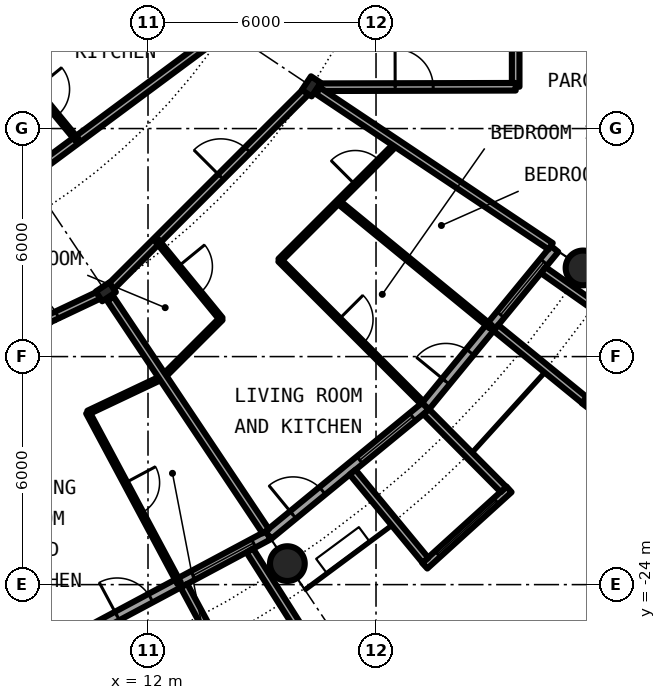
"""IFC4 building model, lengths in metres.
Left out: names, types, materials, properties, quantities, classifications, styles, units other than length and angle.
Written with IfcOpenShell. Run it as: python <this file> out.ifc"""

import sys

from ifc_helpers import new_model, si_unit, direction, frame, frame_2d, origin, origin_2d, place, context, subcontext, project, spatial, rectangle, circle, hollow_circle, i_section, extrude, element, fill, save


model = new_model("IFC4")
c1 = context("Model", 3, precision=1e-05, world=origin(), true_north=direction((0.0, 1.0)))
c2 = subcontext(c1, "Body", "Model", "MODEL_VIEW")
j1 = project(units=[si_unit("LENGTHUNIT", "METRE"), si_unit("PLANEANGLEUNIT", "RADIAN")], contexts=[c1])
p1 = place(None, origin())
s1 = spatial("IfcSite", under=j1, at=p1, CompositionType="ELEMENT")
p2 = place(p1, origin())
s2 = spatial("IfcBuilding", under=s1, at=p2, CompositionType="ELEMENT")
p3 = place(p2, frame((0.0, 0.0, 120.8)))
s3 = spatial("IfcBuildingStorey", under=s2, at=p3, CompositionType="ELEMENT", Elevation=120.8)
for number, where, z_axis, x_axis in (
    (1, (15.667, -23.448, 0.0), (0.0, 0.0, 1.0), (1.0, 0.0, 0.0)),
    (2, (23.448, -15.667, 0.0), (0.0, 0.0, 1.0), (1.0, 0.0, 0.0)),
):
    element("IfcColumn", number, at=place(p3, frame(where, z_axis=z_axis, x_axis=x_axis)), inside=s3, PredefinedType="COLUMN", context=c2, shape_type="SweptSolid", body=[
        extrude(hollow_circle(Radius=0.457, WallThickness=0.04, at=origin_2d()), origin(), (0.0, 0.0, 1.0), 3.05),
    ])
for number, where, z_axis, x_axis in (
    (3, (10.889, -16.297, 0.0), (0.0, 0.0, 1.0), (0.556, -0.831, 0.0)),
    (4, (16.297, -10.889, 0.0), (0.0, 0.0, 1.0), (0.831, -0.556, 0.0)),
):
    element("IfcColumn", number, at=place(p3, frame(where, z_axis=z_axis, x_axis=x_axis)), inside=s3, PredefinedType="COLUMN", context=c2, shape_type="SweptSolid", body=[
        extrude(i_section(OverallWidth=0.307, OverallDepth=0.432, WebThickness=0.021, FlangeThickness=0.04, FilletRadius=0.027, at=origin_2d()), origin(), (0.0, 0.0, 1.0), 3.05),
    ])
p4 = place(p3, frame((10.447, -25.222, 0.0), z_axis=(0.0, 0.0, 1.0), x_axis=(0.881915646801, 0.471407246368, 0.0)))
e5 = element("IfcWall", 5, at=p4, inside=s3, PredefinedType="SOLIDWALL", context=c2, shape_type="SweptSolid", body=[
    extrude(rectangle(XDim=5.352, YDim=0.25, at=frame_2d((2.676, 0.0))), origin(), (0.0, 0.0, 1.0), 2.7),
])
p5 = place(p4, frame((0.841, 0.0, 0.0)))
e6 = element("IfcOpeningElement", 6, at=p5, cuts=e5, PredefinedType="OPENING", context=c2, shape_type="SweptSolid", body=[
    extrude(rectangle(XDim=1.0, YDim=2.2, at=frame_2d((0.5, 1.1))), frame((0.0, 0.135, 0.0), z_axis=(0.0, -1.0, 0.0), x_axis=(1.0, 0.0, 0.0)), (0.0, 0.0, 1.0), 0.27),
])
p6 = place(p4, frame((3.111, 0.0, 0.3)))
e7 = element("IfcOpeningElement", 7, at=p6, cuts=e5, PredefinedType="OPENING", context=c2, shape_type="SweptSolid", body=[
    extrude(rectangle(XDim=1.8, YDim=2.1, at=frame_2d((0.9, 1.05))), frame((0.0, 0.135, 0.0), z_axis=(0.0, -1.0, 0.0), x_axis=(1.0, 0.0, 0.0)), (0.0, 0.0, 1.0), 0.27),
])
p7 = place(p3, frame((12.945, -24.029, -0.03), z_axis=(0.0, 0.0, 1.0), x_axis=(0.474424310775, -0.88029629861, 0.0)))
e8 = element("IfcWall", 8, at=p7, inside=s3, PredefinedType="SOLIDWALL", context=c2, shape_type="SweptSolid", body=[
    extrude(rectangle(XDim=3.006, YDim=0.2, at=frame_2d((1.503, 0.0))), origin(), (0.0, 0.0, 1.0), 2.73),
])
p8 = place(p3, frame((14.678, -23.102, -0.03), z_axis=(0.0, 0.0, 1.0), x_axis=(0.536001536573, -0.844217005746, 0.0)))
e9 = element("IfcWall", 9, at=p8, inside=s3, PredefinedType="SOLIDWALL", context=c2, shape_type="SweptSolid", body=[
    extrude(rectangle(XDim=2.929, YDim=0.2, at=frame_2d((1.465, 0.0))), origin(), (0.0, 0.0, 1.0), 2.73),
])
p9 = place(p3, frame((15.167, -22.699, 0.0), z_axis=(0.0, 0.0, 1.0), x_axis=(0.773019449054, 0.634382322723, 0.0)))
e10 = element("IfcWall", 10, at=p9, inside=s3, PredefinedType="SOLIDWALL", context=c2, shape_type="SweptSolid", body=[
    extrude(rectangle(XDim=5.352, YDim=0.25, at=frame_2d((2.676, 0.0))), origin(), (0.0, 0.0, 1.0), 2.7),
])
p10 = place(p9, frame((0.841, 0.0, 0.0)))
e11 = element("IfcOpeningElement", 11, at=p10, cuts=e10, PredefinedType="OPENING", context=c2, shape_type="SweptSolid", body=[
    extrude(rectangle(XDim=1.0, YDim=2.2, at=frame_2d((0.5, 1.1))), frame((0.0, 0.135, 0.0), z_axis=(0.0, -1.0, 0.0), x_axis=(1.0, 0.0, 0.0)), (0.0, 0.0, 1.0), 0.27),
])
p11 = place(p9, frame((3.111, 0.0, 0.3)))
e12 = element("IfcOpeningElement", 12, at=p11, cuts=e10, PredefinedType="OPENING", context=c2, shape_type="SweptSolid", body=[
    extrude(rectangle(XDim=1.8, YDim=2.1, at=frame_2d((0.9, 1.05))), frame((0.0, 0.135, 0.0), z_axis=(0.0, -1.0, 0.0), x_axis=(1.0, 0.0, 0.0)), (0.0, 0.0, 1.0), 0.27),
])
p12 = place(p3, frame((19.282, -23.503, -0.03), z_axis=(0.0, 0.0, 1.0), x_axis=(0.740998365753, 0.671506829416, 0.0)))
e13 = element("IfcWall", 13, at=p12, inside=s3, PredefinedType="SOLIDWALL", context=c2, shape_type="SweptSolid", body=[
    extrude(rectangle(XDim=2.993, YDim=0.2, at=frame_2d((1.497, 0.0))), origin(), (0.0, 0.0, 1.0), 2.73),
])
p13 = place(p12, frame((0.457, 0.0, 0.33)))
e14 = element("IfcOpeningElement", 14, at=p13, cuts=e13, PredefinedType="OPENING", context=c2, shape_type="SweptSolid", body=[
    extrude(circle(Radius=1.04, at=frame_2d((1.04, 1.04))), frame((0.0, 0.11, 0.0), z_axis=(0.0, -1.0, 0.0), x_axis=(1.0, 0.0, 0.0)), (0.0, 0.0, 1.0), 0.22),
])
p14 = place(p3, frame((17.384, -21.041, -0.03), z_axis=(0.0, 0.0, 1.0), x_axis=(0.63709551667, -0.770784861449, 0.0)))
e15 = element("IfcWall", 15, at=p14, inside=s3, PredefinedType="SOLIDWALL", context=c2, shape_type="SweptSolid", body=[
    extrude(rectangle(XDim=3.006, YDim=0.2, at=frame_2d((1.503, 0.0))), origin(), (0.0, 0.0, 1.0), 2.73),
])
p15 = place(p3, frame((19.323, -19.45, -0.03), z_axis=(0.0, 0.0, 1.0), x_axis=(0.704476739375, -0.709727076896, 0.0)))
e16 = element("IfcWall", 16, at=p15, inside=s3, PredefinedType="SOLIDWALL", context=c2, shape_type="SweptSolid", body=[
    extrude(rectangle(XDim=2.883, YDim=0.2, at=frame_2d((1.441, 0.0))), origin(), (0.0, 0.0, 1.0), 2.73),
])
p16 = place(p3, frame((19.304, -19.304, 0.0), z_axis=(0.0, 0.0, 1.0), x_axis=(0.634382322723, 0.773019449054, 0.0)))
e17 = element("IfcWall", 17, at=p16, inside=s3, PredefinedType="SOLIDWALL", context=c2, shape_type="SweptSolid", body=[
    extrude(rectangle(XDim=5.352, YDim=0.25, at=frame_2d((2.676, 0.0))), origin(), (0.0, 0.0, 1.0), 2.7),
])
p17 = place(p16, frame((0.841, 0.0, 0.0)))
e18 = element("IfcOpeningElement", 18, at=p17, cuts=e17, PredefinedType="OPENING", context=c2, shape_type="SweptSolid", body=[
    extrude(rectangle(XDim=1.0, YDim=2.2, at=frame_2d((0.5, 1.1))), frame((0.0, 0.135, 0.0), z_axis=(0.0, -1.0, 0.0), x_axis=(1.0, 0.0, 0.0)), (0.0, 0.0, 1.0), 0.27),
])
p18 = place(p16, frame((3.111, 0.0, 0.3)))
e19 = element("IfcOpeningElement", 19, at=p18, cuts=e17, PredefinedType="OPENING", context=c2, shape_type="SweptSolid", body=[
    extrude(rectangle(XDim=1.8, YDim=2.1, at=frame_2d((0.9, 1.05))), frame((0.0, 0.135, 0.0), z_axis=(0.0, -1.0, 0.0), x_axis=(1.0, 0.0, 0.0)), (0.0, 0.0, 1.0), 0.27),
])
p19 = place(p3, frame((23.497, -19.289, -0.03), z_axis=(0.0, 0.0, 1.0), x_axis=(0.603375996329, 0.797456837111, 0.0)))
e20 = element("IfcWall", 20, at=p19, inside=s3, PredefinedType="SOLIDWALL", context=c2, shape_type="SweptSolid", body=[
    extrude(rectangle(XDim=2.391, YDim=0.2, at=frame_2d((1.196, 0.0))), origin(), (0.0, 0.0, 1.0), 2.73),
])
p20 = place(p19, frame((0.156, 0.0, 0.33)))
e21 = element("IfcOpeningElement", 21, at=p20, cuts=e20, PredefinedType="OPENING", context=c2, shape_type="SweptSolid", body=[
    extrude(circle(Radius=1.04, at=frame_2d((1.04, 1.04))), frame((0.0, 0.11, 0.0), z_axis=(0.0, -1.0, 0.0), x_axis=(1.0, 0.0, 0.0)), (0.0, 0.0, 1.0), 0.22),
])
p21 = place(p3, frame((21.155, -17.246, -0.03), z_axis=(0.0, 0.0, 1.0), x_axis=(0.775179004516, -0.631741648902, 0.0)))
e22 = element("IfcWall", 22, at=p21, inside=s3, PredefinedType="SOLIDWALL", context=c2, shape_type="SweptSolid", body=[
    extrude(rectangle(XDim=3.006, YDim=0.2, at=frame_2d((1.503, 0.0))), origin(), (0.0, 0.0, 1.0), 2.73),
])
p22 = place(p3, frame((22.402, -15.726, -0.03), z_axis=(0.0, 0.0, 1.0), x_axis=(0.818275399393, -0.574826383135, 0.0)))
e23 = element("IfcWall", 23, at=p22, inside=s3, PredefinedType="SOLIDWALL", context=c2, shape_type="SweptSolid", body=[
    extrude(rectangle(XDim=2.929, YDim=0.2, at=frame_2d((1.465, 0.0))), origin(), (0.0, 0.0, 1.0), 2.73),
])
p23 = place(p3, frame((10.425, -19.47, 0.0), z_axis=(0.0, 0.0, 1.0), x_axis=(0.903951937529, 0.427634066274, 0.0)))
e24 = element("IfcWall", 24, at=p23, inside=s3, PredefinedType="PARTITIONING", context=c2, shape_type="SweptSolid", body=[
    extrude(rectangle(XDim=2.181, YDim=0.1, at=frame_2d((1.091, 0.0))), origin(), (0.0, 0.0, 1.0), 2.7),
])
p24 = place(p3, frame((12.389, -18.542, 0.0), z_axis=(0.0, 0.0, 1.0), x_axis=(0.707106781187, 0.707106781187, 0.0)))
e25 = element("IfcWall", 25, at=p24, inside=s3, PredefinedType="PARTITIONING", context=c2, shape_type="SweptSolid", body=[
    extrude(rectangle(XDim=2.175, YDim=0.1, at=frame_2d((1.088, 0.0))), origin(), (0.0, 0.0, 1.0), 2.7),
])
p25 = place(p3, frame((15.468, -15.463, 0.0), z_axis=(0.0, 0.0, 1.0), x_axis=(0.707106781187, 0.707106781187, 0.0)))
e26 = element("IfcWall", 26, at=p25, inside=s3, PredefinedType="PARTITIONING", context=c2, shape_type="SweptSolid", body=[
    extrude(rectangle(XDim=4.351, YDim=0.1, at=frame_2d((2.176, 0.0))), origin(), (0.0, 0.0, 1.0), 2.7),
])
p26 = place(p25, frame((2.808, 0.0, 0.0)))
e27 = element("IfcOpeningElement", 27, at=p26, cuts=e26, PredefinedType="OPENING", context=c2, shape_type="SweptSolid", body=[
    extrude(rectangle(XDim=0.9, YDim=2.3, at=frame_2d((0.45, 1.15))), frame((0.0, 0.06, 0.0), z_axis=(0.0, -1.0, 0.0), x_axis=(1.0, 0.0, 0.0)), (0.0, 0.0, 1.0), 0.12),
])
p27 = place(p3, frame((21.675, -10.9, 0.0), z_axis=(0.0, 0.0, 1.0), x_axis=(0.0, 1.0, 0.0)))
e28 = element("IfcWall", 28, at=p27, inside=s3, PredefinedType="PARTITIONING", context=c2, shape_type="SweptSolid", body=[
    extrude(rectangle(XDim=1.7, YDim=0.2, at=frame_2d((0.85, 0.0))), origin(), (0.0, 0.0, 1.0), 2.7),
])
p28 = place(p3, frame((5.686, -18.758, 0.0), z_axis=(0.0, 0.0, 1.0), x_axis=(0.903961383505, 0.427614098379, 0.0)))
e29 = element("IfcWall", 29, at=p28, inside=s3, PredefinedType="PARTITIONING", context=c2, shape_type="SweptSolid", body=[
    extrude(rectangle(XDim=5.601, YDim=0.2, at=frame_2d((2.8, 0.0))), origin(), (0.0, 0.0, 1.0), 2.39),
])
p29 = place(p28, frame((3.339, 0.0, 0.0)))
e30 = element("IfcOpeningElement", 30, at=p29, cuts=e29, PredefinedType="OPENING", context=c2, shape_type="SweptSolid", body=[
    extrude(rectangle(XDim=1.0, YDim=2.3, at=frame_2d((0.5, 1.15))), frame((0.0, 0.11, 0.0), z_axis=(0.0, -1.0, 0.0), x_axis=(1.0, 0.0, 0.0)), (0.0, 0.0, 1.0), 0.22),
])
p30 = place(p3, frame((11.0, -16.186, 0.0), z_axis=(0.0, 0.0, 1.0), x_axis=(0.707106781187, 0.707106781187, 0.0)))
e31 = element("IfcWall", 31, at=p30, inside=s3, PredefinedType="PARTITIONING", context=c2, shape_type="SweptSolid", body=[
    extrude(rectangle(XDim=7.334, YDim=0.2, at=frame_2d((3.667, 0.0))), origin(), (0.0, 0.0, 1.0), 2.39),
])
p31 = place(p30, frame((4.123, 0.0, 0.0)))
e32 = element("IfcOpeningElement", 32, at=p31, cuts=e31, PredefinedType="OPENING", context=c2, shape_type="SweptSolid", body=[
    extrude(rectangle(XDim=1.0, YDim=2.3, at=frame_2d((0.5, 1.15))), frame((0.0, 0.11, 0.0), z_axis=(0.0, -1.0, 0.0), x_axis=(1.0, 0.0, 0.0)), (0.0, 0.0, 1.0), 0.22),
])
p32 = place(p3, frame((4.906, -16.172, 0.0), z_axis=(0.0, 0.0, 1.0), x_axis=(0.803204584823, 0.59570327758, 0.0)))
e33 = element("IfcWall", 33, at=p32, inside=s3, PredefinedType="PARTITIONING", context=c2, shape_type="SweptSolid", body=[
    extrude(rectangle(XDim=11.387, YDim=0.2, at=frame_2d((5.693, 0.0))), origin(), (0.0, 0.0, 1.0), 2.7),
])
p33 = place(p32, frame((4.38, 0.0, 0.0)))
e34 = element("IfcOpeningElement", 34, at=p33, cuts=e33, PredefinedType="OPENING", context=c2, shape_type="SweptSolid", body=[
    extrude(rectangle(XDim=1.0, YDim=2.3, at=frame_2d((0.5, 1.15))), frame((0.0, 0.11, 0.0), z_axis=(0.0, -1.0, 0.0), x_axis=(1.0, 0.0, 0.0)), (0.0, 0.0, 1.0), 0.22),
])
p34 = place(p3, frame((8.513, -10.332, 0.0), z_axis=(0.0, 0.0, 1.0), x_axis=(0.803149591038, 0.595777420196, 0.0)))
e35 = element("IfcWall", 35, at=p34, inside=s3, PredefinedType="PARTITIONING", context=c2, shape_type="SweptSolid", body=[
    extrude(rectangle(XDim=1.9, YDim=0.1, at=frame_2d((0.95, 0.0))), origin(), (0.0, 0.0, 1.0), 2.7),
])
p35 = place(p3, frame((16.541, -10.912, 0.0), z_axis=(0.0, 0.0, 1.0), x_axis=(0.999997173357, 0.002377662213, 0.0)))
e36 = element("IfcWall", 36, at=p35, inside=s3, PredefinedType="PARTITIONING", context=c2, shape_type="SweptSolid", body=[
    extrude(rectangle(XDim=5.134, YDim=0.2, at=frame_2d((2.567, 0.0))), origin(), (0.0, 0.0, 1.0), 2.7),
])
p36 = place(p35, frame((1.963, 0.0, 0.0)))
e37 = element("IfcOpeningElement", 37, at=p36, cuts=e36, PredefinedType="OPENING", context=c2, shape_type="SweptSolid", body=[
    extrude(rectangle(XDim=1.0, YDim=2.3, at=frame_2d((0.5, 1.15))), frame((0.0, 0.11, 0.0), z_axis=(0.0, -1.0, 0.0), x_axis=(1.0, 0.0, 0.0)), (0.0, 0.0, 1.0), 0.22),
])
p37 = place(p3, frame((4.908, -5.959, 0.0), z_axis=(0.0, 0.0, 1.0), x_axis=(0.636105207978, -0.771602335652, 0.0)))
e38 = element("IfcWall", 38, at=p37, inside=s3, PredefinedType="PARTITIONING", context=c2, shape_type="SweptSolid", body=[
    extrude(rectangle(XDim=8.213, YDim=0.1, at=frame_2d((4.106, 0.0))), origin(), (0.0, 0.0, 1.0), 2.7),
])
p38 = place(p37, frame((6.49, 0.0, 0.0)))
e39 = element("IfcOpeningElement", 39, at=p38, cuts=e38, PredefinedType="OPENING", context=c2, shape_type="SweptSolid", body=[
    extrude(rectangle(XDim=0.9, YDim=2.3, at=frame_2d((0.45, 1.15))), frame((0.0, 0.06, 0.0), z_axis=(0.0, -1.0, 0.0), x_axis=(1.0, 0.0, 0.0)), (0.0, 0.0, 1.0), 0.12),
])
p39 = place(p37, frame((2.384, 0.0, 0.0)))
e40 = element("IfcOpeningElement", 40, at=p39, cuts=e38, PredefinedType="OPENING", context=c2, shape_type="SweptSolid", body=[
    extrude(rectangle(XDim=0.9, YDim=2.3, at=frame_2d((0.45, 1.15))), frame((0.0, 0.06, 0.0), z_axis=(0.0, -1.0, 0.0), x_axis=(1.0, 0.0, 0.0)), (0.0, 0.0, 1.0), 0.12),
])
p40 = place(p3, frame((10.417, -19.474, 0.0), z_axis=(0.0, 0.0, 1.0), x_axis=(0.471755462896, -0.881729427448, 0.0)))
e41 = element("IfcWall", 41, at=p40, inside=s3, PredefinedType="PARTITIONING", context=c2, shape_type="SweptSolid", body=[
    extrude(rectangle(XDim=5.09, YDim=0.1, at=frame_2d((2.545, 0.0))), origin(), (0.0, 0.0, 1.0), 2.7),
])
p41 = place(p40, frame((2.095, 0.0, 0.0)))
e42 = element("IfcOpeningElement", 42, at=p41, cuts=e41, PredefinedType="OPENING", context=c2, shape_type="SweptSolid", body=[
    extrude(rectangle(XDim=0.9, YDim=2.3, at=frame_2d((0.45, 1.15))), frame((0.0, 0.06, 0.0), z_axis=(0.0, -1.0, 0.0), x_axis=(1.0, 0.0, 0.0)), (0.0, 0.0, 1.0), 0.12),
])
p42 = place(p3, frame((11.009, -16.477, 0.0), z_axis=(0.0, 0.0, 1.0), x_axis=(0.555664536482, -0.831406593008, 0.0)))
e43 = element("IfcWall", 43, at=p42, inside=s3, PredefinedType="PARTITIONING", context=c2, shape_type="SweptSolid", body=[
    extrude(rectangle(XDim=7.358, YDim=0.2, at=frame_2d((3.679, 0.0))), origin(), (0.0, 0.0, 1.0), 2.7),
])
p43 = place(p3, frame((12.237, -14.948, 0.0), z_axis=(0.0, 0.0, 1.0), x_axis=(0.633537478353, -0.773712002958, 0.0)))
e44 = element("IfcWall", 44, at=p43, inside=s3, PredefinedType="PARTITIONING", context=c2, shape_type="SweptSolid", body=[
    extrude(rectangle(XDim=2.661, YDim=0.1, at=frame_2d((1.331, 0.0))), origin(), (0.0, 0.0, 1.0), 2.7),
])
p44 = place(p43, frame((0.881, 0.0, 0.0)))
e45 = element("IfcOpeningElement", 45, at=p44, cuts=e44, PredefinedType="OPENING", context=c2, shape_type="SweptSolid", body=[
    extrude(rectangle(XDim=0.9, YDim=2.3, at=frame_2d((0.45, 1.15))), frame((0.0, 0.06, 0.0), z_axis=(0.0, -1.0, 0.0), x_axis=(1.0, 0.0, 0.0)), (0.0, 0.0, 1.0), 0.12),
])
p45 = place(p3, frame((15.465, -15.465, 0.0), z_axis=(0.0, 0.0, 1.0), x_axis=(0.707106781187, -0.707106781187, 0.0)))
e46 = element("IfcWall", 46, at=p45, inside=s3, PredefinedType="PARTITIONING", context=c2, shape_type="SweptSolid", body=[
    extrude(rectangle(XDim=5.305, YDim=0.1, at=frame_2d((2.652, 0.0))), origin(), (0.0, 0.0, 1.0), 2.7),
])
p46 = place(p45, frame((2.202, 0.0, 0.0)))
e47 = element("IfcOpeningElement", 47, at=p46, cuts=e46, PredefinedType="OPENING", context=c2, shape_type="SweptSolid", body=[
    extrude(rectangle(XDim=0.9, YDim=2.3, at=frame_2d((0.45, 1.15))), frame((0.0, 0.06, 0.0), z_axis=(0.0, -1.0, 0.0), x_axis=(1.0, 0.0, 0.0)), (0.0, 0.0, 1.0), 0.12),
])
p47 = place(p3, frame((16.477, -11.009, 0.0), z_axis=(0.0, 0.0, 1.0), x_axis=(0.831467903109, -0.555572791, 0.0)))
e48 = element("IfcWall", 48, at=p47, inside=s3, PredefinedType="PARTITIONING", context=c2, shape_type="SweptSolid", body=[
    extrude(rectangle(XDim=7.358, YDim=0.2, at=frame_2d((3.679, 0.0))), origin(), (0.0, 0.0, 1.0), 2.7),
])
p48 = place(p3, frame((17.004, -13.927, 0.0), z_axis=(0.0, 0.0, 1.0), x_axis=(0.773517471898, -0.633774976367, 0.0)))
e49 = element("IfcWall", 49, at=p48, inside=s3, PredefinedType="PARTITIONING", context=c2, shape_type="SweptSolid", body=[
    extrude(rectangle(XDim=5.196, YDim=0.1, at=frame_2d((2.598, 0.0))), origin(), (0.0, 0.0, 1.0), 2.7),
])
p49 = place(p5, origin())
e50 = element("IfcDoor", 50, at=p49, inside=s3, OperationType="SINGLE_SWING_LEFT", PredefinedType="DOOR", context=c2, shape_type="SweptSolid", body=[
    extrude(rectangle(XDim=1.0, YDim=2.2, at=frame_2d((0.5, 1.1))), frame((0.0, 0.025, 0.0), z_axis=(0.0, -1.0, 0.0), x_axis=(1.0, 0.0, 0.0)), (0.0, 0.0, 1.0), 0.05),
])
fill(e6, e50)
p50 = place(p6, origin())
e51 = element("IfcWindow", 51, at=p50, inside=s3, PartitioningType="SINGLE_PANEL", PredefinedType="WINDOW", context=c2, shape_type="SweptSolid", body=[
    extrude(rectangle(XDim=1.8, YDim=2.1, at=frame_2d((0.9, 1.05))), frame((0.0, 0.03, 0.0), z_axis=(0.0, -1.0, 0.0), x_axis=(1.0, 0.0, 0.0)), (0.0, 0.0, 1.0), 0.06),
])
fill(e7, e51)
p51 = place(p10, origin())
e52 = element("IfcDoor", 52, at=p51, inside=s3, OperationType="SINGLE_SWING_LEFT", PredefinedType="DOOR", context=c2, shape_type="SweptSolid", body=[
    extrude(rectangle(XDim=1.0, YDim=2.2, at=frame_2d((0.5, 1.1))), frame((0.0, 0.025, 0.0), z_axis=(0.0, -1.0, 0.0), x_axis=(1.0, 0.0, 0.0)), (0.0, 0.0, 1.0), 0.05),
])
fill(e11, e52)
p52 = place(p11, origin())
e53 = element("IfcWindow", 53, at=p52, inside=s3, PartitioningType="SINGLE_PANEL", PredefinedType="WINDOW", context=c2, shape_type="SweptSolid", body=[
    extrude(rectangle(XDim=1.8, YDim=2.1, at=frame_2d((0.9, 1.05))), frame((0.0, 0.03, 0.0), z_axis=(0.0, -1.0, 0.0), x_axis=(1.0, 0.0, 0.0)), (0.0, 0.0, 1.0), 0.06),
])
fill(e12, e53)
p53 = place(p13, origin())
e54 = element("IfcWindow", 54, at=p53, inside=s3, PartitioningType="SINGLE_PANEL", PredefinedType="WINDOW", context=c2, shape_type="SweptSolid", body=[
    extrude(circle(Radius=1.04, at=frame_2d((1.04, 1.04))), frame((0.0, 0.03, 0.0), z_axis=(0.0, -1.0, 0.0), x_axis=(1.0, 0.0, 0.0)), (0.0, 0.0, 1.0), 0.06),
])
fill(e14, e54)
p54 = place(p17, origin())
e55 = element("IfcDoor", 55, at=p54, inside=s3, OperationType="SINGLE_SWING_LEFT", PredefinedType="DOOR", context=c2, shape_type="SweptSolid", body=[
    extrude(rectangle(XDim=1.0, YDim=2.2, at=frame_2d((0.5, 1.1))), frame((0.0, 0.025, 0.0), z_axis=(0.0, -1.0, 0.0), x_axis=(1.0, 0.0, 0.0)), (0.0, 0.0, 1.0), 0.05),
])
fill(e18, e55)
p55 = place(p18, origin())
e56 = element("IfcWindow", 56, at=p55, inside=s3, PartitioningType="SINGLE_PANEL", PredefinedType="WINDOW", context=c2, shape_type="SweptSolid", body=[
    extrude(rectangle(XDim=1.8, YDim=2.1, at=frame_2d((0.9, 1.05))), frame((0.0, 0.03, 0.0), z_axis=(0.0, -1.0, 0.0), x_axis=(1.0, 0.0, 0.0)), (0.0, 0.0, 1.0), 0.06),
])
fill(e19, e56)
p56 = place(p29, origin())
e57 = element("IfcDoor", 57, at=p56, inside=s3, OperationType="SINGLE_SWING_RIGHT", PredefinedType="DOOR", context=c2, shape_type="SweptSolid", body=[
    extrude(rectangle(XDim=1.0, YDim=2.3, at=frame_2d((0.5, 1.15))), frame((0.0, 0.025, 0.0), z_axis=(0.0, -1.0, 0.0), x_axis=(1.0, 0.0, 0.0)), (0.0, 0.0, 1.0), 0.05),
])
fill(e30, e57)
p57 = place(p41, origin())
e58 = element("IfcDoor", 58, at=p57, inside=s3, OperationType="SINGLE_SWING_LEFT", PredefinedType="DOOR", context=c2, shape_type="SweptSolid", body=[
    extrude(rectangle(XDim=0.9, YDim=2.3, at=frame_2d((0.45, 1.15))), frame((0.0, 0.025, 0.0), z_axis=(0.0, -1.0, 0.0), x_axis=(1.0, 0.0, 0.0)), (0.0, 0.0, 1.0), 0.05),
])
fill(e42, e58)
p58 = place(p31, origin())
e59 = element("IfcDoor", 59, at=p58, inside=s3, OperationType="SINGLE_SWING_RIGHT", PredefinedType="DOOR", context=c2, shape_type="SweptSolid", body=[
    extrude(rectangle(XDim=1.0, YDim=2.3, at=frame_2d((0.5, 1.15))), frame((0.0, 0.025, 0.0), z_axis=(0.0, -1.0, 0.0), x_axis=(1.0, 0.0, 0.0)), (0.0, 0.0, 1.0), 0.05),
])
fill(e32, e59)
p59 = place(p44, origin())
e60 = element("IfcDoor", 60, at=p59, inside=s3, OperationType="SINGLE_SWING_RIGHT", PredefinedType="DOOR", context=c2, shape_type="SweptSolid", body=[
    extrude(rectangle(XDim=0.9, YDim=2.3, at=frame_2d((0.45, 1.15))), frame((0.0, 0.025, 0.0), z_axis=(0.0, -1.0, 0.0), x_axis=(1.0, 0.0, 0.0)), (0.0, 0.0, 1.0), 0.05),
])
fill(e45, e60)
p60 = place(p46, origin())
e61 = element("IfcDoor", 61, at=p60, inside=s3, OperationType="SINGLE_SWING_RIGHT", PredefinedType="DOOR", context=c2, shape_type="SweptSolid", body=[
    extrude(rectangle(XDim=0.9, YDim=2.3, at=frame_2d((0.45, 1.15))), frame((0.0, 0.025, 0.0), z_axis=(0.0, -1.0, 0.0), x_axis=(1.0, 0.0, 0.0)), (0.0, 0.0, 1.0), 0.05),
])
fill(e47, e61)
p61 = place(p26, origin())
e62 = element("IfcDoor", 62, at=p61, inside=s3, OperationType="SINGLE_SWING_RIGHT", PredefinedType="DOOR", context=c2, shape_type="SweptSolid", body=[
    extrude(rectangle(XDim=0.9, YDim=2.3, at=frame_2d((0.45, 1.15))), frame((0.0, 0.025, 0.0), z_axis=(0.0, -1.0, 0.0), x_axis=(1.0, 0.0, 0.0)), (0.0, 0.0, 1.0), 0.05),
])
fill(e27, e62)
p62 = place(p38, origin())
e63 = element("IfcDoor", 63, at=p62, inside=s3, OperationType="SINGLE_SWING_RIGHT", PredefinedType="DOOR", context=c2, shape_type="SweptSolid", body=[
    extrude(rectangle(XDim=0.9, YDim=2.3, at=frame_2d((0.45, 1.15))), frame((0.0, 0.025, 0.0), z_axis=(0.0, -1.0, 0.0), x_axis=(1.0, 0.0, 0.0)), (0.0, 0.0, 1.0), 0.05),
])
fill(e39, e63)
p63 = place(p36, origin())
e64 = element("IfcDoor", 64, at=p63, inside=s3, OperationType="SINGLE_SWING_LEFT", PredefinedType="DOOR", context=c2, shape_type="SweptSolid", body=[
    extrude(rectangle(XDim=1.0, YDim=2.3, at=frame_2d((0.5, 1.15))), frame((0.0, 0.025, 0.0), z_axis=(0.0, -1.0, 0.0), x_axis=(1.0, 0.0, 0.0)), (0.0, 0.0, 1.0), 0.05),
])
fill(e37, e64)
save(model, sys.argv[1])
